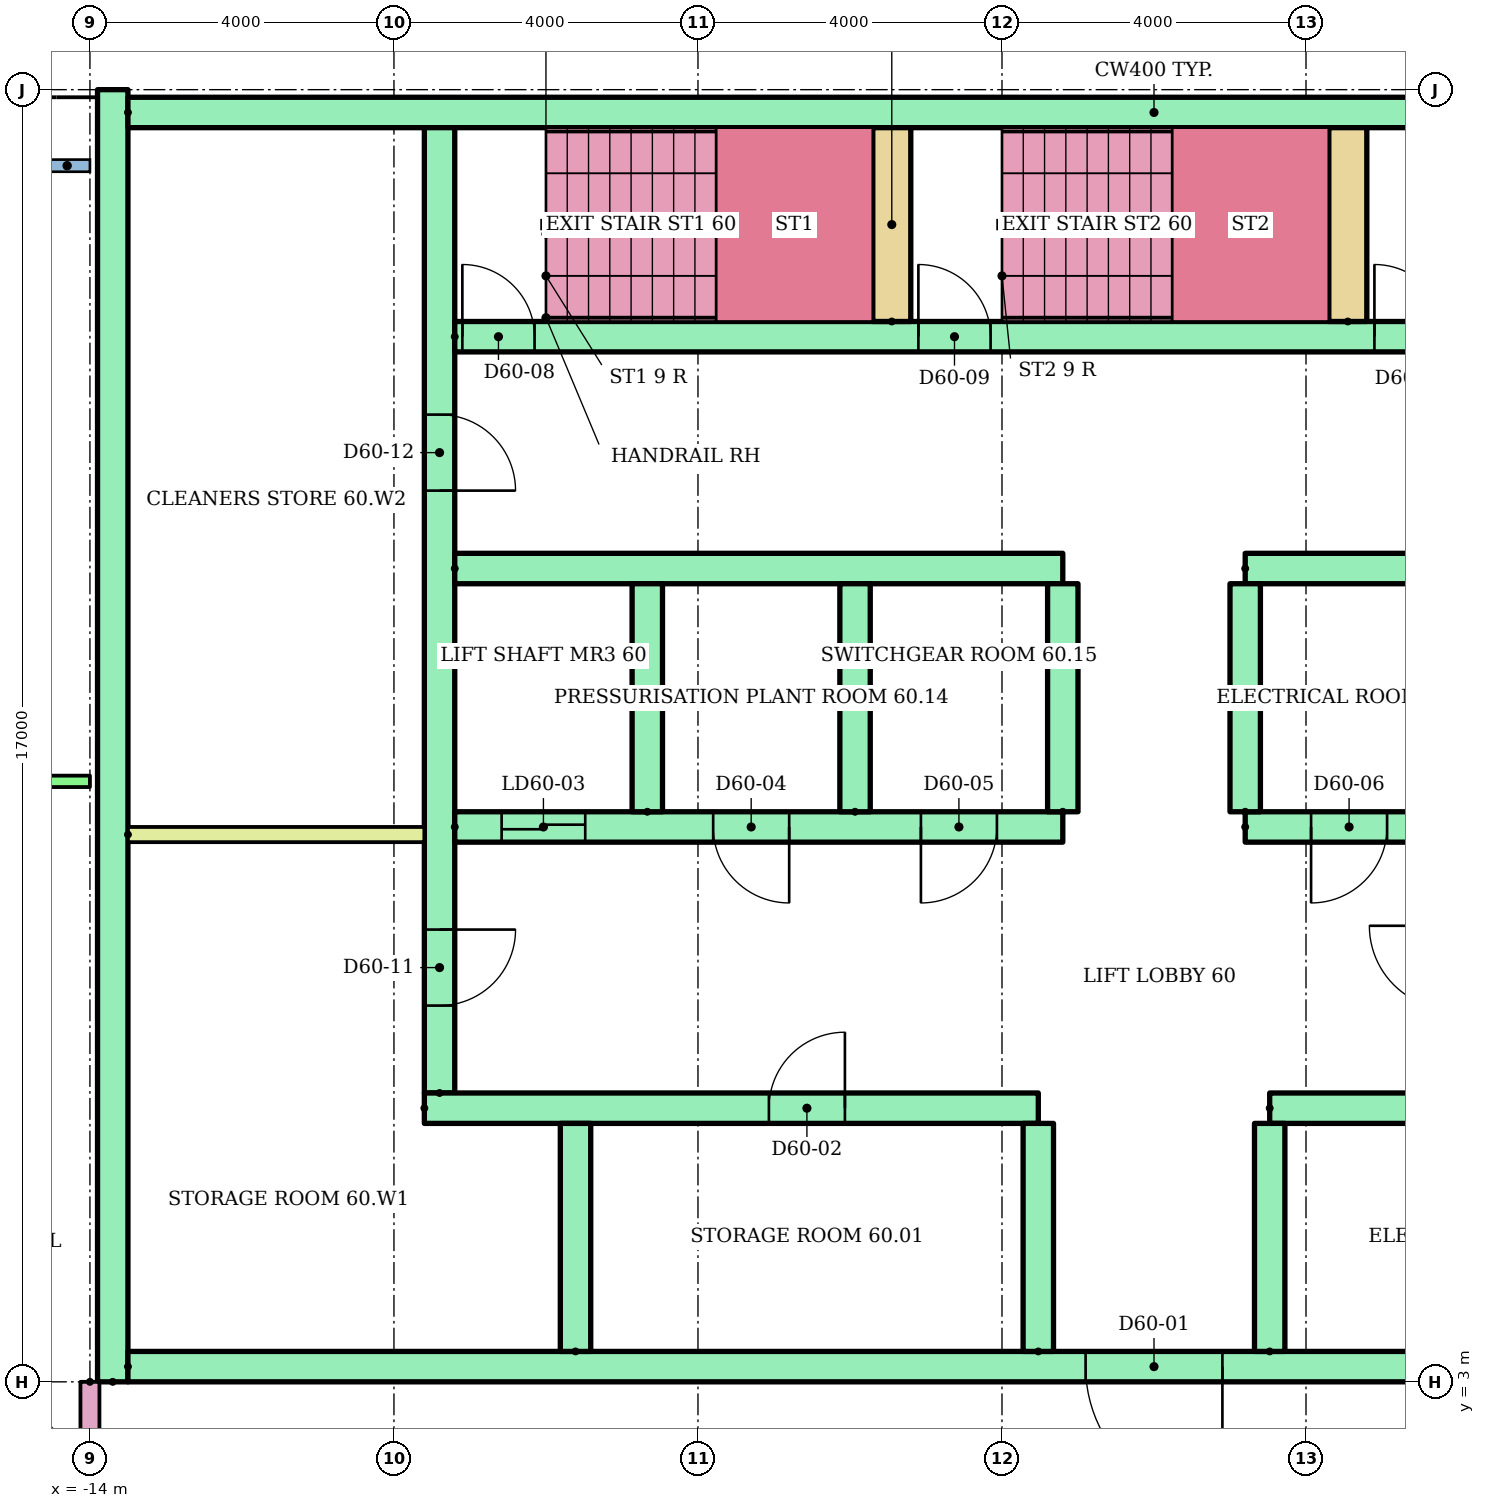
"""IFC4 building model, lengths in metres.
Left out: names, types, materials, properties, quantities, classifications, styles, units other than length and angle.
Written with IfcOpenShell. Run it as: python <this file> out.ifc"""

import sys

from ifc_helpers import new_model, si_unit, direction, frame, frame_2d, origin, place, context, subcontext, project, spatial, rectangle, extrude, element, fill, save


model = new_model("IFC4")
c1 = context("Model", 3, precision=1e-05, world=origin(), true_north=direction((0.0, 1.0)))
c2 = subcontext(c1, "Body", "Model", "MODEL_VIEW")
j1 = project(units=[si_unit("LENGTHUNIT", "METRE"), si_unit("PLANEANGLEUNIT", "RADIAN")], contexts=[c1])
p1 = place(None, origin())
s1 = spatial("IfcSite", under=j1, at=p1, CompositionType="ELEMENT")
p2 = place(p1, origin())
s2 = spatial("IfcBuilding", under=s1, at=p2, CompositionType="ELEMENT")
p3 = place(p2, frame((0.0, 0.0, 230.0)))
s3 = spatial("IfcBuildingStorey", under=s2, at=p3, CompositionType="ELEMENT", Elevation=230.0)
p4 = place(p3, frame((-13.7, 3.0, 0.0), z_axis=(0.0, 0.0, 1.0), x_axis=(0.0, 1.0, 0.0)))
e1 = element("IfcWall", 1, at=p4, inside=s3, PredefinedType="SHEAR", context=c2, shape_type="SweptSolid", body=[
    extrude(rectangle(XDim=17.0, YDim=0.4, at=frame_2d((8.5, 0.0))), origin(), (0.0, 0.0, 1.0), 2.92),
])
p5 = place(p3, frame((-13.5, 19.7, 0.0)))
e2 = element("IfcWall", 2, at=p5, inside=s3, PredefinedType="SHEAR", context=c2, shape_type="SweptSolid", body=[
    extrude(rectangle(XDim=27.0, YDim=0.4, at=frame_2d((13.5, 0.0))), origin(), (0.0, 0.0, 1.0), 2.92),
])
p6 = place(p3, frame((-9.4, 6.8, 0.0), z_axis=(0.0, 0.0, 1.0), x_axis=(0.0, 1.0, 0.0)))
e3 = element("IfcWall", 3, at=p6, inside=s3, PredefinedType="SHEAR", context=c2, shape_type="SweptSolid", body=[
    extrude(rectangle(XDim=12.7, YDim=0.4, at=frame_2d((6.35, 0.0))), origin(), (0.0, 0.0, 1.0), 2.92),
])
p7 = place(p6, frame((1.15, 0.0, 0.0)))
e4 = element("IfcOpeningElement", 4, at=p7, cuts=e3, PredefinedType="OPENING", context=c2, shape_type="SweptSolid", body=[
    extrude(rectangle(XDim=1.0, YDim=2.1, at=frame_2d((0.5, 1.05))), frame((0.0, 0.21, 0.0), z_axis=(0.0, -1.0, 0.0), x_axis=(1.0, 0.0, 0.0)), (0.0, 0.0, 1.0), 0.42),
])
p8 = place(p6, frame((7.925, 0.0, 0.0)))
e5 = element("IfcOpeningElement", 5, at=p8, cuts=e3, PredefinedType="OPENING", context=c2, shape_type="SweptSolid", body=[
    extrude(rectangle(XDim=1.0, YDim=2.1, at=frame_2d((0.5, 1.05))), frame((0.0, 0.21, 0.0), z_axis=(0.0, -1.0, 0.0), x_axis=(1.0, 0.0, 0.0)), (0.0, 0.0, 1.0), 0.42),
])
p9 = place(p3, frame((-13.5, 3.2, 0.0)))
e6 = element("IfcWall", 6, at=p9, inside=s3, PredefinedType="SHEAR", context=c2, shape_type="SweptSolid", body=[
    extrude(rectangle(XDim=27.0, YDim=0.4, at=frame_2d((13.5, 0.0))), origin(), (0.0, 0.0, 1.0), 2.92),
])
p10 = place(p9, frame((22.083, 0.0, 0.0)))
e7 = element("IfcOpeningElement", 7, at=p10, cuts=e6, PredefinedType="OPENING", context=c2, shape_type="SweptSolid", body=[
    extrude(rectangle(XDim=1.1, YDim=2.1, at=frame_2d((0.55, 1.05))), frame((0.0, 0.21, 0.0), z_axis=(0.0, -1.0, 0.0), x_axis=(1.0, 0.0, 0.0)), (0.0, 0.0, 1.0), 0.42),
])
p11 = place(p9, frame((25.128, 0.0, 0.0)))
e8 = element("IfcOpeningElement", 8, at=p11, cuts=e6, PredefinedType="OPENING", context=c2, shape_type="SweptSolid", body=[
    extrude(rectangle(XDim=1.1, YDim=2.1, at=frame_2d((0.55, 1.05))), frame((0.0, 0.21, 0.0), z_axis=(0.0, -1.0, 0.0), x_axis=(1.0, 0.0, 0.0)), (0.0, 0.0, 1.0), 0.42),
])
p12 = place(p9, frame((12.6, 0.0, 0.0)))
e9 = element("IfcOpeningElement", 9, at=p12, cuts=e6, PredefinedType="OPENING", context=c2, shape_type="SweptSolid", body=[
    extrude(rectangle(XDim=1.8, YDim=2.1, at=frame_2d((0.9, 1.05))), frame((0.0, 0.21, 0.0), z_axis=(0.0, -1.0, 0.0), x_axis=(1.0, 0.0, 0.0)), (0.0, 0.0, 1.0), 0.42),
])
p13 = place(p3, frame((-9.6, 6.6, 0.0)))
e10 = element("IfcWall", 10, at=p13, inside=s3, PredefinedType="SHEAR", context=c2, shape_type="SweptSolid", body=[
    extrude(rectangle(XDim=8.078, YDim=0.4, at=frame_2d((4.039, 0.0))), origin(), (0.0, 0.0, 1.0), 2.92),
])
p14 = place(p13, frame((4.533, 0.0, 0.0)))
e11 = element("IfcOpeningElement", 11, at=p14, cuts=e10, PredefinedType="OPENING", context=c2, shape_type="SweptSolid", body=[
    extrude(rectangle(XDim=1.0, YDim=2.1, at=frame_2d((0.5, 1.05))), frame((0.0, 0.21, 0.0), z_axis=(0.0, -1.0, 0.0), x_axis=(1.0, 0.0, 0.0)), (0.0, 0.0, 1.0), 0.42),
])
p15 = place(p3, frame((1.522, 6.6, 0.0)))
e12 = element("IfcWall", 12, at=p15, inside=s3, PredefinedType="SHEAR", context=c2, shape_type="SweptSolid", body=[
    extrude(rectangle(XDim=11.978, YDim=0.4, at=frame_2d((5.989, 0.0))), origin(), (0.0, 0.0, 1.0), 2.92),
])
p16 = place(p15, frame((2.544, 0.0, 0.0)))
e13 = element("IfcOpeningElement", 13, at=p16, cuts=e12, PredefinedType="OPENING", context=c2, shape_type="SweptSolid", body=[
    extrude(rectangle(XDim=1.0, YDim=2.1, at=frame_2d((0.5, 1.05))), frame((0.0, 0.21, 0.0), z_axis=(0.0, -1.0, 0.0), x_axis=(1.0, 0.0, 0.0)), (0.0, 0.0, 1.0), 0.42),
])
for number, where, z_axis, x_axis in (
    (14, (-7.611, 3.4, 0.0), (0.0, 0.0, 1.0), (0.0, 1.0, 0.0)),
    (15, (-1.522, 3.4, 0.0), (0.0, 0.0, 1.0), (0.0, 1.0, 0.0)),
    (16, (1.522, 3.4, 0.0), (0.0, 0.0, 1.0), (0.0, 1.0, 0.0)),
):
    element("IfcWall", number, at=place(p3, frame(where, z_axis=z_axis, x_axis=x_axis)), inside=s3, PredefinedType="SHEAR", context=c2, shape_type="SweptSolid", body=[
        extrude(rectangle(XDim=3.0, YDim=0.4, at=frame_2d((1.5, 0.0))), origin(), (0.0, 0.0, 1.0), 2.92),
    ])
p17 = place(p3, frame((-9.2, 10.3, 0.0)))
e17 = element("IfcWall", 17, at=p17, inside=s3, PredefinedType="SHEAR", context=c2, shape_type="SweptSolid", body=[
    extrude(rectangle(XDim=8.0, YDim=0.4, at=frame_2d((4.0, 0.0))), origin(), (0.0, 0.0, 1.0), 2.92),
])
p18 = place(p17, frame((0.617, 0.0, 0.0)))
e18 = element("IfcOpeningElement", 18, at=p18, cuts=e17, PredefinedType="OPENING", context=c2, shape_type="SweptSolid", body=[
    extrude(rectangle(XDim=1.1, YDim=2.1, at=frame_2d((0.55, 1.05))), frame((0.0, 0.21, 0.0), z_axis=(0.0, -1.0, 0.0), x_axis=(1.0, 0.0, 0.0)), (0.0, 0.0, 1.0), 0.42),
])
p19 = place(p17, frame((3.4, 0.0, 0.0)))
e19 = element("IfcOpeningElement", 19, at=p19, cuts=e17, PredefinedType="OPENING", context=c2, shape_type="SweptSolid", body=[
    extrude(rectangle(XDim=1.0, YDim=2.1, at=frame_2d((0.5, 1.05))), frame((0.0, 0.21, 0.0), z_axis=(0.0, -1.0, 0.0), x_axis=(1.0, 0.0, 0.0)), (0.0, 0.0, 1.0), 0.42),
])
p20 = place(p17, frame((6.133, 0.0, 0.0)))
e20 = element("IfcOpeningElement", 20, at=p20, cuts=e17, PredefinedType="OPENING", context=c2, shape_type="SweptSolid", body=[
    extrude(rectangle(XDim=1.0, YDim=2.1, at=frame_2d((0.5, 1.05))), frame((0.0, 0.21, 0.0), z_axis=(0.0, -1.0, 0.0), x_axis=(1.0, 0.0, 0.0)), (0.0, 0.0, 1.0), 0.42),
])
p21 = place(p3, frame((-9.2, 13.7, 0.0)))
e21 = element("IfcWall", 21, at=p21, inside=s3, PredefinedType="SHEAR", context=c2, shape_type="SweptSolid", body=[
    extrude(rectangle(XDim=8.0, YDim=0.4, at=frame_2d((4.0, 0.0))), origin(), (0.0, 0.0, 1.0), 2.92),
])
p22 = place(p3, frame((1.2, 10.3, 0.0)))
e22 = element("IfcWall", 22, at=p22, inside=s3, PredefinedType="SHEAR", context=c2, shape_type="SweptSolid", body=[
    extrude(rectangle(XDim=8.0, YDim=0.4, at=frame_2d((4.0, 0.0))), origin(), (0.0, 0.0, 1.0), 2.92),
])
p23 = place(p22, frame((3.55, 0.0, 0.0)))
e23 = element("IfcOpeningElement", 23, at=p23, cuts=e22, PredefinedType="OPENING", context=c2, shape_type="SweptSolid", body=[
    extrude(rectangle(XDim=1.1, YDim=2.1, at=frame_2d((0.55, 1.05))), frame((0.0, 0.21, 0.0), z_axis=(0.0, -1.0, 0.0), x_axis=(1.0, 0.0, 0.0)), (0.0, 0.0, 1.0), 0.42),
])
p24 = place(p22, frame((6.283, 0.0, 0.0)))
e24 = element("IfcOpeningElement", 24, at=p24, cuts=e22, PredefinedType="OPENING", context=c2, shape_type="SweptSolid", body=[
    extrude(rectangle(XDim=1.1, YDim=2.1, at=frame_2d((0.55, 1.05))), frame((0.0, 0.21, 0.0), z_axis=(0.0, -1.0, 0.0), x_axis=(1.0, 0.0, 0.0)), (0.0, 0.0, 1.0), 0.42),
])
p25 = place(p22, frame((0.867, 0.0, 0.0)))
e25 = element("IfcOpeningElement", 25, at=p25, cuts=e22, PredefinedType="OPENING", context=c2, shape_type="SweptSolid", body=[
    extrude(rectangle(XDim=1.0, YDim=2.1, at=frame_2d((0.5, 1.05))), frame((0.0, 0.21, 0.0), z_axis=(0.0, -1.0, 0.0), x_axis=(1.0, 0.0, 0.0)), (0.0, 0.0, 1.0), 0.42),
])
p26 = place(p3, frame((1.2, 13.7, 0.0)))
e26 = element("IfcWall", 26, at=p26, inside=s3, PredefinedType="SHEAR", context=c2, shape_type="SweptSolid", body=[
    extrude(rectangle(XDim=8.0, YDim=0.4, at=frame_2d((4.0, 0.0))), origin(), (0.0, 0.0, 1.0), 2.92),
])
for number, where, z_axis, x_axis in (
    (27, (-6.667, 10.5, 0.0), (0.0, 0.0, 1.0), (0.0, 1.0, 0.0)),
    (28, (-3.933, 10.5, 0.0), (0.0, 0.0, 1.0), (0.0, 1.0, 0.0)),
    (29, (-1.2, 10.5, 0.0), (0.0, 0.0, 1.0), (0.0, 1.0, 0.0)),
    (30, (1.2, 10.5, 0.0), (0.0, 0.0, 1.0), (0.0, 1.0, 0.0)),
):
    element("IfcWall", number, at=place(p3, frame(where, z_axis=z_axis, x_axis=x_axis)), inside=s3, PredefinedType="SHEAR", context=c2, shape_type="SweptSolid", body=[
        extrude(rectangle(XDim=3.0, YDim=0.4, at=frame_2d((1.5, 0.0))), origin(), (0.0, 0.0, 1.0), 2.92),
    ])
p27 = place(p3, frame((-9.2, 16.75, 0.0)))
e31 = element("IfcWall", 31, at=p27, inside=s3, PredefinedType="SHEAR", context=c2, shape_type="SweptSolid", body=[
    extrude(rectangle(XDim=18.4, YDim=0.4, at=frame_2d((9.2, 0.0))), origin(), (0.0, 0.0, 1.0), 2.92),
])
p28 = place(p27, frame((0.1, 0.0, 0.0)))
e32 = element("IfcOpeningElement", 32, at=p28, cuts=e31, PredefinedType="OPENING", context=c2, shape_type="SweptSolid", body=[
    extrude(rectangle(XDim=0.95, YDim=2.1, at=frame_2d((0.475, 1.05))), frame((0.0, 0.21, 0.0), z_axis=(0.0, -1.0, 0.0), x_axis=(1.0, 0.0, 0.0)), (0.0, 0.0, 1.0), 0.42),
])
p29 = place(p27, frame((6.1, 0.0, 0.0)))
e33 = element("IfcOpeningElement", 33, at=p29, cuts=e31, PredefinedType="OPENING", context=c2, shape_type="SweptSolid", body=[
    extrude(rectangle(XDim=0.95, YDim=2.1, at=frame_2d((0.475, 1.05))), frame((0.0, 0.21, 0.0), z_axis=(0.0, -1.0, 0.0), x_axis=(1.0, 0.0, 0.0)), (0.0, 0.0, 1.0), 0.42),
])
p30 = place(p27, frame((12.1, 0.0, 0.0)))
e34 = element("IfcOpeningElement", 34, at=p30, cuts=e31, PredefinedType="OPENING", context=c2, shape_type="SweptSolid", body=[
    extrude(rectangle(XDim=0.95, YDim=2.1, at=frame_2d((0.475, 1.05))), frame((0.0, 0.21, 0.0), z_axis=(0.0, -1.0, 0.0), x_axis=(1.0, 0.0, 0.0)), (0.0, 0.0, 1.0), 0.42),
])
for number, where, z_axis, x_axis in (
    (35, (-3.45, 16.95, 0.0), (0.0, 0.0, 1.0), (0.0, 1.0, 0.0)),
    (36, (2.55, 16.95, 0.0), (0.0, 0.0, 1.0), (0.0, 1.0, 0.0)),
):
    element("IfcWall", number, at=place(p3, frame(where, z_axis=z_axis, x_axis=x_axis)), inside=s3, PredefinedType="SHEAR", context=c2, shape_type="SweptSolid", body=[
        extrude(rectangle(XDim=2.55, YDim=0.5, at=frame_2d((1.275, 0.0))), origin(), (0.0, 0.0, 1.0), 2.92),
    ])
p31 = place(p3, frame((-13.5, 10.2, 0.0)))
e37 = element("IfcWall", 37, at=p31, inside=s3, PredefinedType="PARTITIONING", context=c2, shape_type="SweptSolid", body=[
    extrude(rectangle(XDim=3.9, YDim=0.2, at=frame_2d((1.95, 0.0))), origin(), (0.0, 0.0, 1.0), 2.92),
])
p32 = place(p3, frame((-28.92, 10.9, 0.0)))
e38 = element("IfcWall", 38, at=p32, inside=s3, PredefinedType="PARTITIONING", context=c2, shape_type="SweptSolid", body=[
    extrude(rectangle(XDim=14.92, YDim=0.15, at=frame_2d((7.46, 0.0))), origin(), (0.0, 0.0, 1.0), 2.4),
])
p33 = place(p32, frame((1.97, 0.0, 0.0)))
e39 = element("IfcOpeningElement", 39, at=p33, cuts=e38, PredefinedType="OPENING", context=c2, shape_type="SweptSolid", body=[
    extrude(rectangle(XDim=1.0, YDim=2.1, at=frame_2d((0.5, 1.05))), frame((0.0, 0.085, 0.0), z_axis=(0.0, -1.0, 0.0), x_axis=(1.0, 0.0, 0.0)), (0.0, 0.0, 1.0), 0.17),
])
p34 = place(p32, frame((9.32, 0.0, 0.0)))
e40 = element("IfcOpeningElement", 40, at=p34, cuts=e38, PredefinedType="OPENING", context=c2, shape_type="SweptSolid", body=[
    extrude(rectangle(XDim=1.0, YDim=2.1, at=frame_2d((0.5, 1.05))), frame((0.0, 0.085, 0.0), z_axis=(0.0, -1.0, 0.0), x_axis=(1.0, 0.0, 0.0)), (0.0, 0.0, 1.0), 0.17),
])
p35 = place(p3, frame((-14.0, 3.0, 0.0), z_axis=(0.0, 0.0, 1.0), x_axis=(0.0, -1.0, 0.0)))
e41 = element("IfcWall", 41, at=p35, inside=s3, PredefinedType="PARTITIONING", context=c2, shape_type="SweptSolid", body=[
    extrude(rectangle(XDim=1.6, YDim=0.25, at=frame_2d((0.8, 0.0))), origin(), (0.0, 0.0, 1.0), 2.4),
])
p36 = place(p12, frame((1.8, 0.0, 0.0), z_axis=(0.0, 0.0, 1.0), x_axis=(-1.0, 0.0, 0.0)))
e42 = element("IfcDoor", 42, at=p36, inside=s3, OperationType="DOUBLE_DOOR_SINGLE_SWING", PredefinedType="DOOR", context=c2, shape_type="SweptSolid", body=[
    extrude(rectangle(XDim=1.8, YDim=2.1, at=frame_2d((0.9, 1.05))), frame((0.0, 0.025, 0.0), z_axis=(0.0, -1.0, 0.0), x_axis=(1.0, 0.0, 0.0)), (0.0, 0.0, 1.0), 0.05),
])
fill(e9, e42)
p37 = place(p14, origin())
e43 = element("IfcDoor", 43, at=p37, inside=s3, OperationType="SINGLE_SWING_RIGHT", PredefinedType="DOOR", context=c2, shape_type="SweptSolid", body=[
    extrude(rectangle(XDim=1.0, YDim=2.1, at=frame_2d((0.5, 1.05))), frame((0.0, 0.025, 0.0), z_axis=(0.0, -1.0, 0.0), x_axis=(1.0, 0.0, 0.0)), (0.0, 0.0, 1.0), 0.05),
])
fill(e11, e43)
p38 = place(p18, origin())
e44 = element("IfcDoor", 44, at=p38, inside=s3, OperationType="SLIDING_TO_LEFT", PredefinedType="DOOR", context=c2, shape_type="SweptSolid", body=[
    extrude(rectangle(XDim=1.1, YDim=2.1, at=frame_2d((0.55, 1.05))), frame((0.0, 0.025, 0.0), z_axis=(0.0, -1.0, 0.0), x_axis=(1.0, 0.0, 0.0)), (0.0, 0.0, 1.0), 0.05),
])
fill(e18, e44)
p39 = place(p19, frame((1.0, 0.0, 0.0), z_axis=(0.0, 0.0, 1.0), x_axis=(-1.0, 0.0, 0.0)))
e45 = element("IfcDoor", 45, at=p39, inside=s3, OperationType="SINGLE_SWING_RIGHT", PredefinedType="DOOR", context=c2, shape_type="SweptSolid", body=[
    extrude(rectangle(XDim=1.0, YDim=2.1, at=frame_2d((0.5, 1.05))), frame((0.0, 0.025, 0.0), z_axis=(0.0, -1.0, 0.0), x_axis=(1.0, 0.0, 0.0)), (0.0, 0.0, 1.0), 0.05),
])
fill(e19, e45)
p40 = place(p20, frame((1.0, 0.0, 0.0), z_axis=(0.0, 0.0, 1.0), x_axis=(-1.0, 0.0, 0.0)))
e46 = element("IfcDoor", 46, at=p40, inside=s3, OperationType="SINGLE_SWING_LEFT", PredefinedType="DOOR", context=c2, shape_type="SweptSolid", body=[
    extrude(rectangle(XDim=1.0, YDim=2.1, at=frame_2d((0.5, 1.05))), frame((0.0, 0.025, 0.0), z_axis=(0.0, -1.0, 0.0), x_axis=(1.0, 0.0, 0.0)), (0.0, 0.0, 1.0), 0.05),
])
fill(e20, e46)
p41 = place(p25, frame((1.0, 0.0, 0.0), z_axis=(0.0, 0.0, 1.0), x_axis=(-1.0, 0.0, 0.0)))
e47 = element("IfcDoor", 47, at=p41, inside=s3, OperationType="SINGLE_SWING_LEFT", PredefinedType="DOOR", context=c2, shape_type="SweptSolid", body=[
    extrude(rectangle(XDim=1.0, YDim=2.1, at=frame_2d((0.5, 1.05))), frame((0.0, 0.025, 0.0), z_axis=(0.0, -1.0, 0.0), x_axis=(1.0, 0.0, 0.0)), (0.0, 0.0, 1.0), 0.05),
])
fill(e25, e47)
p42 = place(p28, origin())
e48 = element("IfcDoor", 48, at=p42, inside=s3, OperationType="SINGLE_SWING_LEFT", PredefinedType="DOOR", context=c2, shape_type="SweptSolid", body=[
    extrude(rectangle(XDim=0.95, YDim=2.1, at=frame_2d((0.475, 1.05))), frame((0.0, 0.025, 0.0), z_axis=(0.0, -1.0, 0.0), x_axis=(1.0, 0.0, 0.0)), (0.0, 0.0, 1.0), 0.05),
])
fill(e32, e48)
p43 = place(p29, origin())
e49 = element("IfcDoor", 49, at=p43, inside=s3, OperationType="SINGLE_SWING_LEFT", PredefinedType="DOOR", context=c2, shape_type="SweptSolid", body=[
    extrude(rectangle(XDim=0.95, YDim=2.1, at=frame_2d((0.475, 1.05))), frame((0.0, 0.025, 0.0), z_axis=(0.0, -1.0, 0.0), x_axis=(1.0, 0.0, 0.0)), (0.0, 0.0, 1.0), 0.05),
])
fill(e33, e49)
p44 = place(p30, origin())
e50 = element("IfcDoor", 50, at=p44, inside=s3, OperationType="SINGLE_SWING_LEFT", PredefinedType="DOOR", context=c2, shape_type="SweptSolid", body=[
    extrude(rectangle(XDim=0.95, YDim=2.1, at=frame_2d((0.475, 1.05))), frame((0.0, 0.025, 0.0), z_axis=(0.0, -1.0, 0.0), x_axis=(1.0, 0.0, 0.0)), (0.0, 0.0, 1.0), 0.05),
])
fill(e34, e50)
p45 = place(p7, frame((1.0, 0.0, 0.0), z_axis=(0.0, 0.0, 1.0), x_axis=(-1.0, 0.0, 0.0)))
e51 = element("IfcDoor", 51, at=p45, inside=s3, OperationType="SINGLE_SWING_RIGHT", PredefinedType="DOOR", context=c2, shape_type="SweptSolid", body=[
    extrude(rectangle(XDim=1.0, YDim=2.1, at=frame_2d((0.5, 1.05))), frame((0.0, 0.025, 0.0), z_axis=(0.0, -1.0, 0.0), x_axis=(1.0, 0.0, 0.0)), (0.0, 0.0, 1.0), 0.05),
])
fill(e4, e51)
p46 = place(p8, frame((1.0, 0.0, 0.0), z_axis=(0.0, 0.0, 1.0), x_axis=(-1.0, 0.0, 0.0)))
e52 = element("IfcDoor", 52, at=p46, inside=s3, OperationType="SINGLE_SWING_LEFT", PredefinedType="DOOR", context=c2, shape_type="SweptSolid", body=[
    extrude(rectangle(XDim=1.0, YDim=2.1, at=frame_2d((0.5, 1.05))), frame((0.0, 0.025, 0.0), z_axis=(0.0, -1.0, 0.0), x_axis=(1.0, 0.0, 0.0)), (0.0, 0.0, 1.0), 0.05),
])
fill(e5, e52)
save(model, sys.argv[1])
